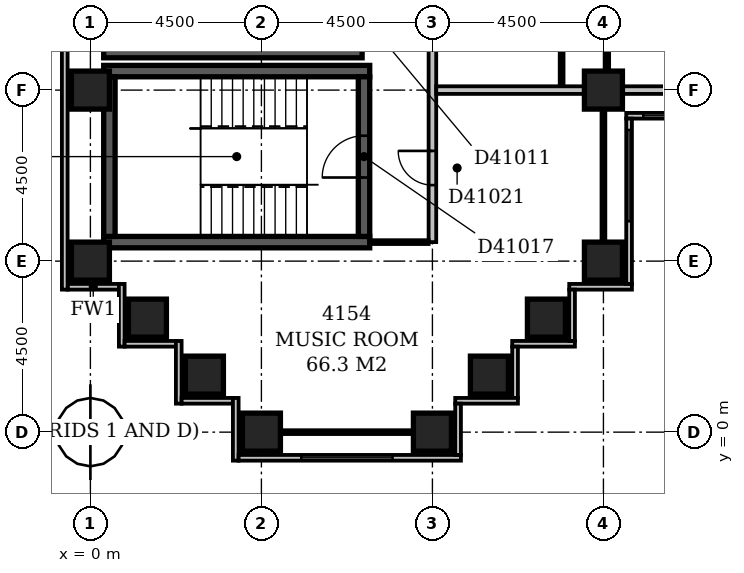
"""IFC4 building model, lengths in metres.
Left out: names, types, materials, properties, quantities, classifications, styles, units other than length and angle.
Written with IfcOpenShell. Run it as: python <this file> out.ifc"""

import sys

from ifc_helpers import new_model, si_unit, direction, frame, frame_2d, origin, origin_2d, place, context, subcontext, project, spatial, rectangle, extrude, element, fill, save


model = new_model("IFC4")
c1 = context("Model", 3, precision=1e-05, world=origin(), true_north=direction((0.0, 1.0)))
c2 = subcontext(c1, "Body", "Model", "MODEL_VIEW")
j1 = project(units=[si_unit("LENGTHUNIT", "METRE"), si_unit("PLANEANGLEUNIT", "RADIAN")], contexts=[c1])
p1 = place(None, origin())
s1 = spatial("IfcSite", under=j1, at=p1, CompositionType="ELEMENT")
p2 = place(p1, origin())
s2 = spatial("IfcBuilding", under=s1, at=p2, CompositionType="ELEMENT")
p3 = place(p2, frame((0.0, 0.0, 162.8)))
s3 = spatial("IfcBuildingStorey", under=s2, at=p3, CompositionType="ELEMENT", Elevation=162.8)
for number, where, z_axis, x_axis in (
    (1, (0.35, 5.0, -0.3), (0.0, 0.0, 1.0), (1.0, 0.0, 0.0)),
    (2, (0.35, 9.5, -0.3), (0.0, 0.0, 1.0), (1.0, 0.0, 0.0)),
):
    element("IfcWall", number, at=place(p3, frame(where, z_axis=z_axis, x_axis=x_axis)), inside=s3, PredefinedType="SHEAR", context=c2, shape_type="SweptSolid", body=[
        extrude(rectangle(XDim=7.0, YDim=0.3, at=frame_2d((3.5, 0.0))), origin(), (0.0, 0.0, 1.0), 3.6),
    ])
p4 = place(p3, frame((0.35, 10.0, -0.3), z_axis=(0.0, 0.0, 1.0), x_axis=(1.0, 0.0, 0.0)))
e3 = element("IfcWall", 3, at=p4, inside=s3, PredefinedType="SHEAR", context=c2, shape_type="SweptSolid", body=[
    extrude(rectangle(XDim=6.8, YDim=0.3, at=frame_2d((3.4, 0.0))), origin(), (0.0, 0.0, 1.0), 3.6),
])
p5 = place(p3, frame((0.5, 5.15, -0.3), z_axis=(0.0, 0.0, 1.0), x_axis=(0.0, 1.0, 0.0)))
e4 = element("IfcWall", 4, at=p5, inside=s3, PredefinedType="SHEAR", context=c2, shape_type="SweptSolid", body=[
    extrude(rectangle(XDim=4.2, YDim=0.3, at=frame_2d((2.1, 0.0))), origin(), (0.0, 0.0, 1.0), 3.6),
])
p6 = place(p3, frame((7.2, 5.15, -0.3), z_axis=(0.0, 0.0, 1.0), x_axis=(0.0, 1.0, 0.0)))
e5 = element("IfcWall", 5, at=p6, inside=s3, PredefinedType="SHEAR", context=c2, shape_type="SweptSolid", body=[
    extrude(rectangle(XDim=4.2, YDim=0.3, at=frame_2d((2.1, 0.0))), origin(), (0.0, 0.0, 1.0), 3.6),
])
p7 = place(p6, frame((1.55, 0.0, 0.3)))
e6 = element("IfcOpeningElement", 6, at=p7, cuts=e5, PredefinedType="OPENING", context=c2, shape_type="SweptSolid", body=[
    extrude(rectangle(XDim=1.1, YDim=2.1, at=frame_2d((0.55, 1.05))), frame((0.0, 0.162, 0.0), z_axis=(0.0, -1.0, 0.0), x_axis=(1.0, 0.0, 0.0)), (0.0, 0.0, 1.0), 0.324),
])
for number, where, z_axis, x_axis in (
    (7, (4.5, 0.0, -0.3), (0.0, 0.0, 1.0), (1.0, 0.0, 0.0)),
    (8, (9.0, 0.0, -0.3), (0.0, 0.0, 1.0), (1.0, 0.0, 0.0)),
    (9, (3.0, 1.5, -0.3), (0.0, 0.0, 1.0), (1.0, 0.0, 0.0)),
    (10, (10.5, 1.5, -0.3), (0.0, 0.0, 1.0), (1.0, 0.0, 0.0)),
    (11, (1.5, 3.0, -0.3), (0.0, 0.0, 1.0), (1.0, 0.0, 0.0)),
    (12, (12.0, 3.0, -0.3), (0.0, 0.0, 1.0), (1.0, 0.0, 0.0)),
    (13, (0.0, 4.5, -0.3), (0.0, 0.0, 1.0), (1.0, 0.0, 0.0)),
    (14, (13.5, 4.5, -0.3), (0.0, 0.0, 1.0), (1.0, 0.0, 0.0)),
    (15, (0.0, 9.0, -0.3), (0.0, 0.0, 1.0), (1.0, 0.0, 0.0)),
    (16, (13.5, 9.0, -0.3), (0.0, 0.0, 1.0), (1.0, 0.0, 0.0)),
):
    element("IfcColumn", number, at=place(p3, frame(where, z_axis=z_axis, x_axis=x_axis)), inside=s3, PredefinedType="COLUMN", context=c2, shape_type="SweptSolid", body=[
        extrude(rectangle(XDim=1.0, YDim=1.0, at=origin_2d()), origin(), (0.0, 0.0, 1.0), 3.6),
    ])
p8 = place(p3, frame((9.675, -0.6, 0.0), z_axis=(0.0, 0.0, 1.0), x_axis=(0.0, 1.0, 0.0)))
e17 = element("IfcWall", 17, at=p8, inside=s3, PredefinedType="STANDARD", context=c2, shape_type="SweptSolid", body=[
    extrude(rectangle(XDim=1.35, YDim=0.15, at=frame_2d((0.675, 0.0))), origin(), (0.0, 0.0, 1.0), 2.7),
])
p9 = place(p3, frame((9.6, 0.825, 0.0), z_axis=(0.0, 0.0, 1.0), x_axis=(1.0, 0.0, 0.0)))
e18 = element("IfcWall", 18, at=p9, inside=s3, PredefinedType="STANDARD", context=c2, shape_type="SweptSolid", body=[
    extrude(rectangle(XDim=1.65, YDim=0.15, at=frame_2d((0.825, 0.0))), origin(), (0.0, 0.0, 1.0), 2.7),
])
p10 = place(p3, frame((11.175, 0.9, 0.0), z_axis=(0.0, 0.0, 1.0), x_axis=(0.0, 1.0, 0.0)))
e19 = element("IfcWall", 19, at=p10, inside=s3, PredefinedType="STANDARD", context=c2, shape_type="SweptSolid", body=[
    extrude(rectangle(XDim=1.35, YDim=0.15, at=frame_2d((0.675, 0.0))), origin(), (0.0, 0.0, 1.0), 2.7),
])
p11 = place(p3, frame((11.1, 2.325, 0.0), z_axis=(0.0, 0.0, 1.0), x_axis=(1.0, 0.0, 0.0)))
e20 = element("IfcWall", 20, at=p11, inside=s3, PredefinedType="STANDARD", context=c2, shape_type="SweptSolid", body=[
    extrude(rectangle(XDim=1.65, YDim=0.15, at=frame_2d((0.825, 0.0))), origin(), (0.0, 0.0, 1.0), 2.7),
])
p12 = place(p3, frame((12.675, 2.4, 0.0), z_axis=(0.0, 0.0, 1.0), x_axis=(0.0, 1.0, 0.0)))
e21 = element("IfcWall", 21, at=p12, inside=s3, PredefinedType="STANDARD", context=c2, shape_type="SweptSolid", body=[
    extrude(rectangle(XDim=1.35, YDim=0.15, at=frame_2d((0.675, 0.0))), origin(), (0.0, 0.0, 1.0), 2.7),
])
p13 = place(p3, frame((12.6, 3.825, 0.0), z_axis=(0.0, 0.0, 1.0), x_axis=(1.0, 0.0, 0.0)))
e22 = element("IfcWall", 22, at=p13, inside=s3, PredefinedType="STANDARD", context=c2, shape_type="SweptSolid", body=[
    extrude(rectangle(XDim=1.65, YDim=0.15, at=frame_2d((0.825, 0.0))), origin(), (0.0, 0.0, 1.0), 2.7),
])
p14 = place(p3, frame((14.175, 3.9, 0.0), z_axis=(0.0, 0.0, 1.0), x_axis=(0.0, 1.0, 0.0)))
e23 = element("IfcWall", 23, at=p14, inside=s3, PredefinedType="STANDARD", context=c2, shape_type="SweptSolid", body=[
    extrude(rectangle(XDim=4.35, YDim=0.15, at=frame_2d((2.175, 0.0))), origin(), (0.0, 0.0, 1.0), 2.7),
])
p15 = place(p14, frame((1.65, 0.0, 0.6)))
e24 = element("IfcOpeningElement", 24, at=p15, cuts=e23, PredefinedType="OPENING", context=c2, shape_type="SweptSolid", body=[
    extrude(rectangle(XDim=2.4, YDim=1.8, at=frame_2d((1.2, 0.9))), frame((0.0, 0.087, 0.0), z_axis=(0.0, -1.0, 0.0), x_axis=(1.0, 0.0, 0.0)), (0.0, 0.0, 1.0), 0.174),
])
p16 = place(p3, frame((14.1, 8.325, 0.0), z_axis=(0.0, 0.0, 1.0), x_axis=(1.0, 0.0, 0.0)))
e25 = element("IfcWall", 25, at=p16, inside=s3, PredefinedType="STANDARD", context=c2, shape_type="SweptSolid", body=[
    extrude(rectangle(XDim=4.65, YDim=0.15, at=frame_2d((2.325, 0.0))), origin(), (0.0, 0.0, 1.0), 2.7),
])
p17 = place(p16, frame((0.45, 0.0, 0.6)))
e26 = element("IfcOpeningElement", 26, at=p17, cuts=e25, PredefinedType="OPENING", context=c2, shape_type="SweptSolid", body=[
    extrude(rectangle(XDim=2.4, YDim=1.8, at=frame_2d((1.2, 0.9))), frame((0.0, 0.087, 0.0), z_axis=(0.0, -1.0, 0.0), x_axis=(1.0, 0.0, 0.0)), (0.0, 0.0, 1.0), 0.174),
])
p18 = place(p3, frame((-0.675, 59.1, 0.0), z_axis=(0.0, 0.0, 1.0), x_axis=(0.0, -1.0, 0.0)))
e27 = element("IfcWall", 27, at=p18, inside=s3, PredefinedType="STANDARD", context=c2, shape_type="SweptSolid", body=[
    extrude(rectangle(XDim=55.35, YDim=0.15, at=frame_2d((27.675, 0.0))), origin(), (0.0, 0.0, 1.0), 2.7),
])
p19 = place(p18, frame((43.095, 0.0, 0.6)))
e28 = element("IfcOpeningElement", 28, at=p19, cuts=e27, PredefinedType="OPENING", context=c2, shape_type="SweptSolid", body=[
    extrude(rectangle(XDim=1.8, YDim=1.8, at=frame_2d((0.9, 0.9))), frame((0.0, 0.087, 0.0), z_axis=(0.0, -1.0, 0.0), x_axis=(1.0, 0.0, 0.0)), (0.0, 0.0, 1.0), 0.174),
])
p20 = place(p3, frame((-0.6, 3.825, 0.0), z_axis=(0.0, 0.0, 1.0), x_axis=(1.0, 0.0, 0.0)))
e29 = element("IfcWall", 29, at=p20, inside=s3, PredefinedType="STANDARD", context=c2, shape_type="SweptSolid", body=[
    extrude(rectangle(XDim=1.35, YDim=0.15, at=frame_2d((0.675, 0.0))), origin(), (0.0, 0.0, 1.0), 2.7),
])
p21 = place(p3, frame((0.825, 3.9, 0.0), z_axis=(0.0, 0.0, 1.0), x_axis=(0.0, -1.0, 0.0)))
e30 = element("IfcWall", 30, at=p21, inside=s3, PredefinedType="STANDARD", context=c2, shape_type="SweptSolid", body=[
    extrude(rectangle(XDim=1.65, YDim=0.15, at=frame_2d((0.825, 0.0))), origin(), (0.0, 0.0, 1.0), 2.7),
])
p22 = place(p3, frame((0.9, 2.325, 0.0), z_axis=(0.0, 0.0, 1.0), x_axis=(1.0, 0.0, 0.0)))
e31 = element("IfcWall", 31, at=p22, inside=s3, PredefinedType="STANDARD", context=c2, shape_type="SweptSolid", body=[
    extrude(rectangle(XDim=1.35, YDim=0.15, at=frame_2d((0.675, 0.0))), origin(), (0.0, 0.0, 1.0), 2.7),
])
p23 = place(p3, frame((2.325, 2.4, 0.0), z_axis=(0.0, 0.0, 1.0), x_axis=(0.0, -1.0, 0.0)))
e32 = element("IfcWall", 32, at=p23, inside=s3, PredefinedType="STANDARD", context=c2, shape_type="SweptSolid", body=[
    extrude(rectangle(XDim=1.65, YDim=0.15, at=frame_2d((0.825, 0.0))), origin(), (0.0, 0.0, 1.0), 2.7),
])
p24 = place(p3, frame((2.4, 0.825, 0.0), z_axis=(0.0, 0.0, 1.0), x_axis=(1.0, 0.0, 0.0)))
e33 = element("IfcWall", 33, at=p24, inside=s3, PredefinedType="STANDARD", context=c2, shape_type="SweptSolid", body=[
    extrude(rectangle(XDim=1.35, YDim=0.15, at=frame_2d((0.675, 0.0))), origin(), (0.0, 0.0, 1.0), 2.7),
])
p25 = place(p3, frame((3.825, 0.9, 0.0), z_axis=(0.0, 0.0, 1.0), x_axis=(0.0, -1.0, 0.0)))
e34 = element("IfcWall", 34, at=p25, inside=s3, PredefinedType="STANDARD", context=c2, shape_type="SweptSolid", body=[
    extrude(rectangle(XDim=1.65, YDim=0.15, at=frame_2d((0.825, 0.0))), origin(), (0.0, 0.0, 1.0), 2.7),
])
p26 = place(p3, frame((3.9, -0.675, 0.0), z_axis=(0.0, 0.0, 1.0), x_axis=(1.0, 0.0, 0.0)))
e35 = element("IfcWall", 35, at=p26, inside=s3, PredefinedType="STANDARD", context=c2, shape_type="SweptSolid", body=[
    extrude(rectangle(XDim=5.85, YDim=0.15, at=frame_2d((2.925, 0.0))), origin(), (0.0, 0.0, 1.0), 2.7),
])
p27 = place(p26, frame((1.65, 0.0, 0.6)))
e36 = element("IfcOpeningElement", 36, at=p27, cuts=e35, PredefinedType="OPENING", context=c2, shape_type="SweptSolid", body=[
    extrude(rectangle(XDim=2.4, YDim=1.8, at=frame_2d((1.2, 0.9))), frame((0.0, 0.087, 0.0), z_axis=(0.0, -1.0, 0.0), x_axis=(1.0, 0.0, 0.0)), (0.0, 0.0, 1.0), 0.174),
])
p28 = place(p3, frame((5.0, 0.0, 0.0), z_axis=(0.0, 0.0, 1.0), x_axis=(1.0, 0.0, 0.0)))
e37 = element("IfcWall", 37, at=p28, inside=s3, PredefinedType="PARTITIONING", context=c2, shape_type="SweptSolid", body=[
    extrude(rectangle(XDim=3.5, YDim=0.1, at=frame_2d((1.75, 0.0))), origin(), (0.0, 0.0, 1.0), 2.7),
])
p29 = place(p3, frame((0.0, 4.5, 0.0), z_axis=(0.0, 0.0, 1.0), x_axis=(0.0, 1.0, 0.0)))
e38 = element("IfcWall", 38, at=p29, inside=s3, PredefinedType="PARTITIONING", context=c2, shape_type="SweptSolid", body=[
    extrude(rectangle(XDim=0.5, YDim=0.1, at=frame_2d((0.25, 0.0))), origin(), (0.0, 0.0, 1.0), 2.7),
])
p30 = place(p3, frame((7.349, 5.0, 0.0), z_axis=(0.0, 0.0, 1.0), x_axis=(1.0, 0.0, 0.0)))
e39 = element("IfcWall", 39, at=p30, inside=s3, PredefinedType="PARTITIONING", context=c2, shape_type="SweptSolid", body=[
    extrude(rectangle(XDim=1.551, YDim=0.1, at=frame_2d((0.775, 0.0))), origin(), (0.0, 0.0, 1.0), 3.3),
])
p31 = place(p3, frame((9.0, 5.0, 0.0), z_axis=(0.0, 0.0, 1.0), x_axis=(0.0, 1.0, 0.0)))
e40 = element("IfcWall", 40, at=p31, inside=s3, PredefinedType="PARTITIONING", context=c2, shape_type="SweptSolid", body=[
    extrude(rectangle(XDim=27.75, YDim=0.2, at=frame_2d((13.875, 0.0))), origin(), (0.0, 0.0, 1.0), 3.3),
])
p32 = place(p31, frame((22.8, 0.0, 0.0)))
e41 = element("IfcOpeningElement", 41, at=p32, cuts=e40, PredefinedType="OPENING", context=c2, shape_type="SweptSolid", body=[
    extrude(rectangle(XDim=1.0, YDim=2.1, at=frame_2d((0.5, 1.05))), frame((0.0, 0.112, 0.0), z_axis=(0.0, -1.0, 0.0), x_axis=(1.0, 0.0, 0.0)), (0.0, 0.0, 1.0), 0.224),
])
p33 = place(p31, frame((14.95, 0.0, 0.0)))
e42 = element("IfcOpeningElement", 42, at=p33, cuts=e40, PredefinedType="OPENING", context=c2, shape_type="SweptSolid", body=[
    extrude(rectangle(XDim=1.0, YDim=2.1, at=frame_2d((0.5, 1.05))), frame((0.0, 0.112, 0.0), z_axis=(0.0, -1.0, 0.0), x_axis=(1.0, 0.0, 0.0)), (0.0, 0.0, 1.0), 0.224),
])
p34 = place(p31, frame((9.3, 0.0, 0.0)))
e43 = element("IfcOpeningElement", 43, at=p34, cuts=e40, PredefinedType="OPENING", context=c2, shape_type="SweptSolid", body=[
    extrude(rectangle(XDim=1.0, YDim=2.1, at=frame_2d((0.5, 1.05))), frame((0.0, 0.112, 0.0), z_axis=(0.0, -1.0, 0.0), x_axis=(1.0, 0.0, 0.0)), (0.0, 0.0, 1.0), 0.224),
])
p35 = place(p31, frame((1.5, 0.0, 0.0)))
e44 = element("IfcOpeningElement", 44, at=p35, cuts=e40, PredefinedType="OPENING", context=c2, shape_type="SweptSolid", body=[
    extrude(rectangle(XDim=0.9, YDim=2.1, at=frame_2d((0.45, 1.05))), frame((0.0, 0.112, 0.0), z_axis=(0.0, -1.0, 0.0), x_axis=(1.0, 0.0, 0.0)), (0.0, 0.0, 1.0), 0.224),
])
p36 = place(p3, frame((13.5, 5.0, 0.0), z_axis=(0.0, 0.0, 1.0), x_axis=(0.0, 1.0, 0.0)))
e45 = element("IfcWall", 45, at=p36, inside=s3, PredefinedType="PARTITIONING", context=c2, shape_type="SweptSolid", body=[
    extrude(rectangle(XDim=3.5, YDim=0.1, at=frame_2d((1.75, 0.0))), origin(), (0.0, 0.0, 1.0), 2.7),
])
p37 = place(p3, frame((9.1, 9.0, 0.0), z_axis=(0.0, 0.0, 1.0), x_axis=(1.0, 0.0, 0.0)))
e46 = element("IfcWall", 46, at=p37, inside=s3, PredefinedType="PARTITIONING", context=c2, shape_type="SweptSolid", body=[
    extrude(rectangle(XDim=3.9, YDim=0.2, at=frame_2d((1.95, 0.0))), origin(), (0.0, 0.0, 1.0), 3.3),
])
p38 = place(p3, frame((14.0, 9.0, 0.0), z_axis=(0.0, 0.0, 1.0), x_axis=(1.0, 0.0, 0.0)))
e47 = element("IfcWall", 47, at=p38, inside=s3, PredefinedType="PARTITIONING", context=c2, shape_type="SweptSolid", body=[
    extrude(rectangle(XDim=3.5, YDim=0.2, at=frame_2d((1.75, 0.0))), origin(), (0.0, 0.0, 1.0), 2.7),
])
p39 = place(p3, frame((12.4, 9.1, 0.0), z_axis=(0.0, 0.0, 1.0), x_axis=(0.0, 1.0, 0.0)))
e48 = element("IfcWall", 48, at=p39, inside=s3, PredefinedType="PARTITIONING", context=c2, shape_type="SweptSolid", body=[
    extrude(rectangle(XDim=4.9, YDim=0.1, at=frame_2d((2.45, 0.0))), origin(), (0.0, 0.0, 1.0), 3.3),
])
p40 = place(p39, frame((1.95, 0.0, 0.0)))
e49 = element("IfcOpeningElement", 49, at=p40, cuts=e48, PredefinedType="OPENING", context=c2, shape_type="SweptSolid", body=[
    extrude(rectangle(XDim=0.9, YDim=2.1, at=frame_2d((0.45, 1.05))), frame((0.0, 0.062, 0.0), z_axis=(0.0, -1.0, 0.0), x_axis=(1.0, 0.0, 0.0)), (0.0, 0.0, 1.0), 0.124),
])
p41 = place(p3, frame((13.6, 9.5, 0.0), z_axis=(0.0, 0.0, 1.0), x_axis=(0.0, 1.0, 0.0)))
e50 = element("IfcWall", 50, at=p41, inside=s3, PredefinedType="PARTITIONING", context=c2, shape_type="SweptSolid", body=[
    extrude(rectangle(XDim=8.4, YDim=0.1, at=frame_2d((4.2, 0.0))), origin(), (0.0, 0.0, 1.0), 3.3),
])
p42 = place(p41, frame((1.3, 0.0, 0.0)))
e51 = element("IfcOpeningElement", 51, at=p42, cuts=e50, PredefinedType="OPENING", context=c2, shape_type="SweptSolid", body=[
    extrude(rectangle(XDim=0.9, YDim=2.1, at=frame_2d((0.45, 1.05))), frame((0.0, 0.062, 0.0), z_axis=(0.0, -1.0, 0.0), x_axis=(1.0, 0.0, 0.0)), (0.0, 0.0, 1.0), 0.124),
])
p43 = place(p41, frame((5.8, 0.0, 0.0)))
e52 = element("IfcOpeningElement", 52, at=p43, cuts=e50, PredefinedType="OPENING", context=c2, shape_type="SweptSolid", body=[
    extrude(rectangle(XDim=0.9, YDim=2.1, at=frame_2d((0.45, 1.05))), frame((0.0, 0.062, 0.0), z_axis=(0.0, -1.0, 0.0), x_axis=(1.0, 0.0, 0.0)), (0.0, 0.0, 1.0), 0.124),
])
p44 = place(p15, origin())
e53 = element("IfcWindow", 53, at=p44, inside=s3, PartitioningType="SINGLE_PANEL", PredefinedType="WINDOW", context=c2, shape_type="SweptSolid", body=[
    extrude(rectangle(XDim=2.4, YDim=1.8, at=frame_2d((1.2, 0.9))), frame((0.0, 0.03, 0.0), z_axis=(0.0, -1.0, 0.0), x_axis=(1.0, 0.0, 0.0)), (0.0, 0.0, 1.0), 0.06),
])
fill(e24, e53)
p45 = place(p17, origin())
e54 = element("IfcWindow", 54, at=p45, inside=s3, PartitioningType="SINGLE_PANEL", PredefinedType="WINDOW", context=c2, shape_type="SweptSolid", body=[
    extrude(rectangle(XDim=2.4, YDim=1.8, at=frame_2d((1.2, 0.9))), frame((0.0, 0.03, 0.0), z_axis=(0.0, -1.0, 0.0), x_axis=(1.0, 0.0, 0.0)), (0.0, 0.0, 1.0), 0.06),
])
fill(e26, e54)
p46 = place(p27, origin())
e55 = element("IfcWindow", 55, at=p46, inside=s3, PartitioningType="SINGLE_PANEL", PredefinedType="WINDOW", context=c2, shape_type="SweptSolid", body=[
    extrude(rectangle(XDim=2.4, YDim=1.8, at=frame_2d((1.2, 0.9))), frame((0.0, 0.03, 0.0), z_axis=(0.0, -1.0, 0.0), x_axis=(1.0, 0.0, 0.0)), (0.0, 0.0, 1.0), 0.06),
])
fill(e36, e55)
p47 = place(p7, origin())
e56 = element("IfcDoor", 56, at=p47, inside=s3, OperationType="SINGLE_SWING_LEFT", PredefinedType="DOOR", context=c2, shape_type="SweptSolid", body=[
    extrude(rectangle(XDim=1.1, YDim=2.1, at=frame_2d((0.55, 1.05))), frame((0.0, 0.025, 0.0), z_axis=(0.0, -1.0, 0.0), x_axis=(1.0, 0.0, 0.0)), (0.0, 0.0, 1.0), 0.05),
])
fill(e6, e56)
p48 = place(p35, frame((0.9, 0.0, 0.0), z_axis=(0.0, 0.0, 1.0), x_axis=(-1.0, 0.0, 0.0)))
e57 = element("IfcDoor", 57, at=p48, inside=s3, OperationType="SINGLE_SWING_LEFT", PredefinedType="DOOR", context=c2, shape_type="SweptSolid", body=[
    extrude(rectangle(XDim=0.9, YDim=2.1, at=frame_2d((0.45, 1.05))), frame((0.0, 0.025, 0.0), z_axis=(0.0, -1.0, 0.0), x_axis=(1.0, 0.0, 0.0)), (0.0, 0.0, 1.0), 0.05),
])
fill(e44, e57)
save(model, sys.argv[1])
